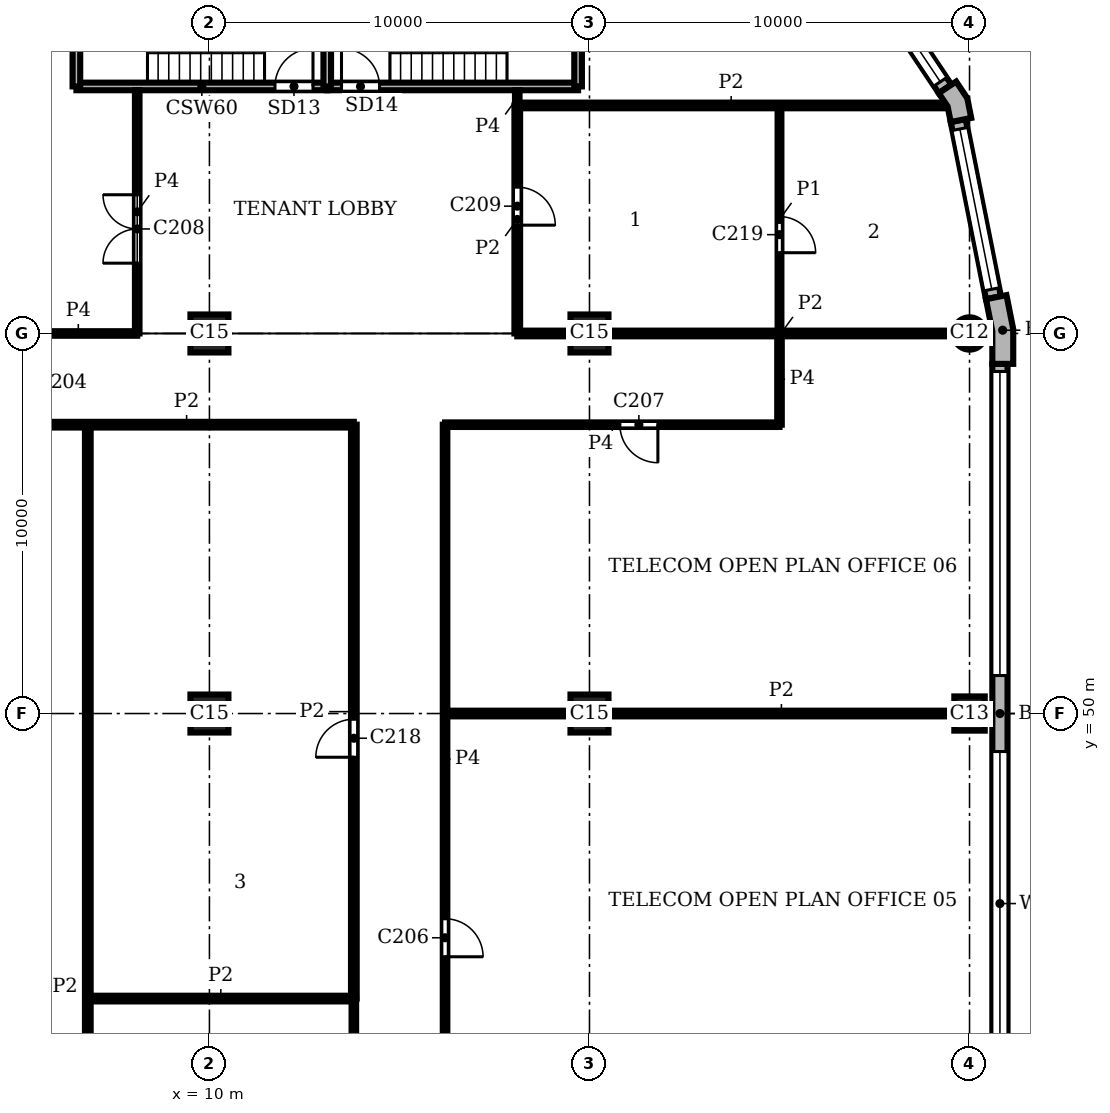
"""IFC4 building model, lengths in metres.
Left out: names, types, materials, properties, quantities, classifications, styles, units other than length and angle.
Written with IfcOpenShell. Run it as: python <this file> out.ifc"""

import sys

from ifc_helpers import new_model, si_unit, direction, frame, frame_2d, origin, origin_2d, place, context, subcontext, project, spatial, polyline, rectangle, circle, outline, extrude, element, fill, save


model = new_model("IFC4")
c1 = context("Model", 3, precision=1e-05, world=origin(), true_north=direction((0.0, 1.0)))
c2 = subcontext(c1, "Body", "Model", "MODEL_VIEW")
j1 = project(units=[si_unit("LENGTHUNIT", "METRE"), si_unit("PLANEANGLEUNIT", "RADIAN")], contexts=[c1])
p1 = place(None, origin())
s1 = spatial("IfcSite", under=j1, at=p1, CompositionType="ELEMENT")
p2 = place(p1, origin())
s2 = spatial("IfcBuilding", under=s1, at=p2, CompositionType="ELEMENT")
p3 = place(p2, frame((0.0, 0.0, 263.1)))
s3 = spatial("IfcBuildingStorey", under=s2, at=p3, CompositionType="ELEMENT", Elevation=263.1)
p4 = place(p3, frame((30.0, 50.0, 0.0), z_axis=(0.0, 0.0, 1.0), x_axis=(0.0, 1.0, 0.0)))
e1 = element("IfcColumn", 1, at=p4, inside=s3, PredefinedType="COLUMN", context=c2, shape_type="SweptSolid", body=[
    extrude(rectangle(XDim=0.9, YDim=0.8, at=origin_2d()), origin(), (0.0, 0.0, 1.0), 3.9),
])
p5 = place(p3, frame((30.0, 60.0, 0.0), z_axis=(0.0, 0.0, 1.0), x_axis=(1.0, 0.0, 0.0)))
e2 = element("IfcColumn", 2, at=p5, inside=s3, PredefinedType="COLUMN", context=c2, shape_type="SweptSolid", body=[
    extrude(circle(Radius=0.425, at=origin_2d()), origin(), (0.0, 0.0, 1.0), 3.9),
])
for number, where, z_axis, x_axis in (
    (3, (10.0, 50.0, 0.0), (0.0, 0.0, 1.0), (1.0, 0.0, 0.0)),
    (4, (10.0, 60.0, 0.0), (0.0, 0.0, 1.0), (1.0, 0.0, 0.0)),
    (5, (20.0, 50.0, 0.0), (0.0, 0.0, 1.0), (1.0, 0.0, 0.0)),
    (6, (20.0, 60.0, 0.0), (0.0, 0.0, 1.0), (1.0, 0.0, 0.0)),
):
    element("IfcColumn", number, at=place(p3, frame(where, z_axis=z_axis, x_axis=x_axis)), inside=s3, PredefinedType="COLUMN", context=c2, shape_type="SweptSolid", body=[
        extrude(rectangle(XDim=1.0, YDim=1.0, at=origin_2d()), origin(), (0.0, 0.0, 1.0), 3.9),
    ])
p6 = place(p3, origin())
e7 = element("IfcWall", 7, at=p6, inside=s3, PredefinedType="SOLIDWALL", context=c2, shape_type="SweptSolid", body=[
    extrude(outline(polyline([(31.0, 59.2), (31.15, 59.2), (31.15, 60.113), (30.972, 61.009), (30.825, 60.98), (30.432, 60.902), (30.6, 60.059), (30.6, 59.2), (31.0, 59.2)])), origin(), (0.0, 0.0, 1.0), 3.9),
])
e8 = element("IfcWall", 8, at=p6, inside=s3, PredefinedType="SOLIDWALL", context=c2, shape_type="SweptSolid", body=[
    extrude(outline(polyline([(29.897, 65.641), (30.045, 65.67), (29.941, 66.189), (29.648, 66.629), (29.523, 66.545), (29.19, 66.323), (29.423, 65.974), (29.505, 65.563), (29.897, 65.641)])), origin(), (0.0, 0.0, 1.0), 3.9),
])
p7 = place(p3, frame((30.8, 40.8, 0.0), z_axis=(0.0, 0.0, 1.0), x_axis=(0.0, 1.0, 0.0)))
e9 = element("IfcWall", 9, at=p7, inside=s3, PredefinedType="SOLIDWALL", context=c2, shape_type="SweptSolid", body=[
    extrude(rectangle(XDim=18.4, YDim=0.4, at=frame_2d((9.2, 0.0))), origin(), (0.0, 0.0, 1.0), 3.9),
])
p8 = place(p7, frame((0.2, 0.0, 0.9)))
e10 = element("IfcOpeningElement", 10, at=p8, cuts=e9, PredefinedType="OPENING", context=c2, shape_type="SweptSolid", body=[
    extrude(rectangle(XDim=8.0, YDim=2.35, at=frame_2d((4.0, 1.175))), frame((0.0, 0.21, 0.0), z_axis=(0.0, -1.0, 0.0), x_axis=(1.0, 0.0, 0.0)), (0.0, 0.0, 1.0), 0.42),
])
p9 = place(p7, frame((10.2, 0.0, 0.9)))
e11 = element("IfcOpeningElement", 11, at=p9, cuts=e9, PredefinedType="OPENING", context=c2, shape_type="SweptSolid", body=[
    extrude(rectangle(XDim=8.0, YDim=2.35, at=frame_2d((4.0, 1.175))), frame((0.0, 0.21, 0.0), z_axis=(0.0, -1.0, 0.0), x_axis=(1.0, 0.0, 0.0)), (0.0, 0.0, 1.0), 0.42),
])
p10 = place(p3, frame((30.629, 60.941, 0.0), z_axis=(0.0, 0.0, 1.0), x_axis=(-0.195098533057, 0.98078364709, 0.0)))
e12 = element("IfcWall", 12, at=p10, inside=s3, PredefinedType="SOLIDWALL", context=c2, shape_type="SweptSolid", body=[
    extrude(rectangle(XDim=4.753, YDim=0.4, at=frame_2d((2.376, 0.0))), origin(), (0.0, 0.0, 1.0), 3.9),
])
p11 = place(p10, frame((0.226, 0.0, 0.9)))
e13 = element("IfcOpeningElement", 13, at=p11, cuts=e12, PredefinedType="OPENING", context=c2, shape_type="SweptSolid", body=[
    extrude(rectangle(XDim=4.3, YDim=2.35, at=frame_2d((2.15, 1.175))), frame((0.0, 0.21, 0.0), z_axis=(0.0, -1.0, 0.0), x_axis=(1.0, 0.0, 0.0)), (0.0, 0.0, 1.0), 0.42),
])
p12 = place(p3, frame((29.357, 66.434, 0.0), z_axis=(0.0, 0.0, 1.0), x_axis=(-0.555541552266, 0.831488775454, 0.0)))
e14 = element("IfcWall", 14, at=p12, inside=s3, PredefinedType="SOLIDWALL", context=c2, shape_type="SweptSolid", body=[
    extrude(rectangle(XDim=4.753, YDim=0.4, at=frame_2d((2.376, 0.0))), origin(), (0.0, 0.0, 1.0), 3.9),
])
p13 = place(p12, frame((0.226, 0.0, 0.9)))
e15 = element("IfcOpeningElement", 15, at=p13, cuts=e14, PredefinedType="OPENING", context=c2, shape_type="SweptSolid", body=[
    extrude(rectangle(XDim=4.3, YDim=2.35, at=frame_2d((2.15, 1.175))), frame((0.0, 0.21, 0.0), z_axis=(0.0, -1.0, 0.0), x_axis=(1.0, 0.0, 0.0)), (0.0, 0.0, 1.0), 0.42),
])
p14 = place(p3, frame((6.5, 66.5, 0.0), z_axis=(0.0, 0.0, 1.0), x_axis=(1.0, 0.0, 0.0)))
e16 = element("IfcWall", 16, at=p14, inside=s3, PredefinedType="SHEAR", context=c2, shape_type="SweptSolid", body=[
    extrude(rectangle(XDim=6.6, YDim=0.2, at=frame_2d((3.3, 0.0))), origin(), (0.0, 0.0, 1.0), 3.58),
])
p15 = place(p14, frame((5.225, 0.0, 0.0)))
e17 = element("IfcOpeningElement", 17, at=p15, cuts=e16, PredefinedType="OPENING", context=c2, shape_type="SweptSolid", body=[
    extrude(rectangle(XDim=1.0, YDim=2.1, at=frame_2d((0.5, 1.05))), frame((0.0, 0.11, 0.0), z_axis=(0.0, -1.0, 0.0), x_axis=(1.0, 0.0, 0.0)), (0.0, 0.0, 1.0), 0.22),
])
p16 = place(p3, frame((13.1, 66.5, 0.0), z_axis=(0.0, 0.0, 1.0), x_axis=(1.0, 0.0, 0.0)))
e18 = element("IfcWall", 18, at=p16, inside=s3, PredefinedType="SHEAR", context=c2, shape_type="SweptSolid", body=[
    extrude(rectangle(XDim=6.6, YDim=0.2, at=frame_2d((3.3, 0.0))), origin(), (0.0, 0.0, 1.0), 3.58),
])
p17 = place(p16, frame((0.375, 0.0, 0.0)))
e19 = element("IfcOpeningElement", 19, at=p17, cuts=e18, PredefinedType="OPENING", context=c2, shape_type="SweptSolid", body=[
    extrude(rectangle(XDim=1.0, YDim=2.1, at=frame_2d((0.5, 1.05))), frame((0.0, 0.11, 0.0), z_axis=(0.0, -1.0, 0.0), x_axis=(1.0, 0.0, 0.0)), (0.0, 0.0, 1.0), 0.22),
])
for number, where, z_axis, x_axis in (
    (20, (6.5, 66.5, 0.0), (0.0, 0.0, 1.0), (0.0, 1.0, 0.0)),
    (21, (13.1, 66.5, 0.0), (0.0, 0.0, 1.0), (0.0, 1.0, 0.0)),
    (22, (19.7, 66.5, 0.0), (0.0, 0.0, 1.0), (0.0, 1.0, 0.0)),
):
    element("IfcWall", number, at=place(p3, frame(where, z_axis=z_axis, x_axis=x_axis)), inside=s3, PredefinedType="SHEAR", context=c2, shape_type="SweptSolid", body=[
        extrude(rectangle(XDim=3.3, YDim=0.2, at=frame_2d((1.65, 0.0))), origin(), (0.0, 0.0, 1.0), 3.58),
    ])
p18 = place(p3, frame((25.0, 60.0, 0.0), z_axis=(0.0, 0.0, 1.0), x_axis=(0.0, 1.0, 0.0)))
e23 = element("IfcWall", 23, at=p18, inside=s3, PredefinedType="PARTITIONING", context=c2, shape_type="SweptSolid", body=[
    extrude(rectangle(XDim=6.0, YDim=0.1, at=frame_2d((3.0, 0.0))), origin(), (0.0, 0.0, 1.0), 3.58),
])
p19 = place(p18, frame((2.125, 0.0, 0.0)))
e24 = element("IfcOpeningElement", 24, at=p19, cuts=e23, PredefinedType="OPENING", context=c2, shape_type="SweptSolid", body=[
    extrude(rectangle(XDim=0.95, YDim=2.1, at=frame_2d((0.475, 1.05))), frame((0.0, 0.06, 0.0), z_axis=(0.0, -1.0, 0.0), x_axis=(1.0, 0.0, 0.0)), (0.0, 0.0, 1.0), 0.12),
])
p20 = place(p3, frame((6.8, 28.0, 0.0), z_axis=(0.0, 0.0, 1.0), x_axis=(0.0, 1.0, 0.0)))
e25 = element("IfcWall", 25, at=p20, inside=s3, PredefinedType="PARTITIONING", context=c2, shape_type="SweptSolid", body=[
    extrude(rectangle(XDim=29.6, YDim=0.15, at=frame_2d((14.8, 0.0))), origin(), (0.0, 0.0, 1.0), 3.58),
])
p21 = place(p3, frame((13.8, 42.5, 0.0), z_axis=(0.0, 0.0, 1.0), x_axis=(0.0, 1.0, 0.0)))
e26 = element("IfcWall", 26, at=p21, inside=s3, PredefinedType="PARTITIONING", context=c2, shape_type="SweptSolid", body=[
    extrude(rectangle(XDim=15.1, YDim=0.15, at=frame_2d((7.55, 0.0))), origin(), (0.0, 0.0, 1.0), 3.58),
])
p22 = place(p21, frame((6.35, 0.0, 0.0)))
e27 = element("IfcOpeningElement", 27, at=p22, cuts=e26, PredefinedType="OPENING", context=c2, shape_type="SweptSolid", body=[
    extrude(rectangle(XDim=1.0, YDim=2.1, at=frame_2d((0.5, 1.05))), frame((0.0, 0.085, 0.0), z_axis=(0.0, -1.0, 0.0), x_axis=(1.0, 0.0, 0.0)), (0.0, 0.0, 1.0), 0.17),
])
p23 = place(p3, frame((18.1, 60.0, 0.0), z_axis=(0.0, 0.0, 1.0), x_axis=(0.0, 1.0, 0.0)))
e28 = element("IfcWall", 28, at=p23, inside=s3, PredefinedType="PARTITIONING", context=c2, shape_type="SweptSolid", body=[
    extrude(rectangle(XDim=6.0, YDim=0.15, at=frame_2d((3.0, 0.0))), origin(), (0.0, 0.0, 1.0), 3.58),
])
p24 = place(p23, frame((2.85, 0.0, 0.0)))
e29 = element("IfcOpeningElement", 29, at=p24, cuts=e28, PredefinedType="OPENING", context=c2, shape_type="SweptSolid", body=[
    extrude(rectangle(XDim=1.0, YDim=2.1, at=frame_2d((0.5, 1.05))), frame((0.0, 0.085, 0.0), z_axis=(0.0, -1.0, 0.0), x_axis=(1.0, 0.0, 0.0)), (0.0, 0.0, 1.0), 0.17),
])
p25 = place(p3, frame((6.8, 42.5, 0.0), z_axis=(0.0, 0.0, 1.0), x_axis=(1.0, 0.0, 0.0)))
e30 = element("IfcWall", 30, at=p25, inside=s3, PredefinedType="PARTITIONING", context=c2, shape_type="SweptSolid", body=[
    extrude(rectangle(XDim=7.0, YDim=0.15, at=frame_2d((3.5, 0.0))), origin(), (0.0, 0.0, 1.0), 3.58),
])
p26 = place(p3, frame((16.2, 50.0, 0.0), z_axis=(0.0, 0.0, 1.0), x_axis=(1.0, 0.0, 0.0)))
e31 = element("IfcWall", 31, at=p26, inside=s3, PredefinedType="PARTITIONING", context=c2, shape_type="SweptSolid", body=[
    extrude(rectangle(XDim=3.3, YDim=0.15, at=frame_2d((1.65, 0.0))), origin(), (0.0, 0.0, 1.0), 3.58),
])
p27 = place(p3, frame((20.5, 50.0, 0.0), z_axis=(0.0, 0.0, 1.0), x_axis=(1.0, 0.0, 0.0)))
e32 = element("IfcWall", 32, at=p27, inside=s3, PredefinedType="PARTITIONING", context=c2, shape_type="SweptSolid", body=[
    extrude(rectangle(XDim=9.1, YDim=0.15, at=frame_2d((4.55, 0.0))), origin(), (0.0, 0.0, 1.0), 3.58),
])
p28 = place(p3, frame((5.0, 57.6, 0.0), z_axis=(0.0, 0.0, 1.0), x_axis=(1.0, 0.0, 0.0)))
e33 = element("IfcWall", 33, at=p28, inside=s3, PredefinedType="PARTITIONING", context=c2, shape_type="SweptSolid", body=[
    extrude(rectangle(XDim=8.8, YDim=0.15, at=frame_2d((4.4, 0.0))), origin(), (0.0, 0.0, 1.0), 3.58),
])
p29 = place(p3, frame((18.1, 60.0, 0.0), z_axis=(0.0, 0.0, 1.0), x_axis=(1.0, 0.0, 0.0)))
e34 = element("IfcWall", 34, at=p29, inside=s3, PredefinedType="PARTITIONING", context=c2, shape_type="SweptSolid", body=[
    extrude(rectangle(XDim=1.4, YDim=0.15, at=frame_2d((0.7, 0.0))), origin(), (0.0, 0.0, 1.0), 3.58),
])
p30 = place(p3, frame((20.5, 60.0, 0.0), z_axis=(0.0, 0.0, 1.0), x_axis=(1.0, 0.0, 0.0)))
e35 = element("IfcWall", 35, at=p30, inside=s3, PredefinedType="PARTITIONING", context=c2, shape_type="SweptSolid", body=[
    extrude(rectangle(XDim=9.075, YDim=0.15, at=frame_2d((4.538, 0.0))), origin(), (0.0, 0.0, 1.0), 3.58),
])
p31 = place(p3, frame((18.1, 66.0, 0.0), z_axis=(0.0, 0.0, 1.0), x_axis=(1.0, 0.0, 0.0)))
e36 = element("IfcWall", 36, at=p31, inside=s3, PredefinedType="PARTITIONING", context=c2, shape_type="SweptSolid", body=[
    extrude(rectangle(XDim=11.256, YDim=0.15, at=frame_2d((5.628, 0.0))), origin(), (0.0, 0.0, 1.0), 3.58),
])
p32 = place(p3, frame((8.1, 60.0, 0.0), z_axis=(0.0, 0.0, 1.0), x_axis=(0.0, 1.0, 0.0)))
e37 = element("IfcWall", 37, at=p32, inside=s3, PredefinedType="PARTITIONING", context=c2, shape_type="SweptSolid", body=[
    extrude(rectangle(XDim=6.4, YDim=0.12, at=frame_2d((3.2, 0.0))), origin(), (0.0, 0.0, 1.0), 3.58),
])
p33 = place(p32, frame((1.85, 0.0, 0.0)))
e38 = element("IfcOpeningElement", 38, at=p33, cuts=e37, PredefinedType="OPENING", context=c2, shape_type="SweptSolid", body=[
    extrude(rectangle(XDim=1.8, YDim=2.1, at=frame_2d((0.9, 1.05))), frame((0.0, 0.07, 0.0), z_axis=(0.0, -1.0, 0.0), x_axis=(1.0, 0.0, 0.0)), (0.0, 0.0, 1.0), 0.14),
])
p34 = place(p3, frame((13.8, 30.8, 0.0), z_axis=(0.0, 0.0, 1.0), x_axis=(0.0, 1.0, 0.0)))
e39 = element("IfcWall", 39, at=p34, inside=s3, PredefinedType="PARTITIONING", context=c2, shape_type="SweptSolid", body=[
    extrude(rectangle(XDim=11.7, YDim=0.12, at=frame_2d((5.85, 0.0))), origin(), (0.0, 0.0, 1.0), 3.58),
])
p35 = place(p34, frame((4.85, 0.0, 0.0)))
e40 = element("IfcOpeningElement", 40, at=p35, cuts=e39, PredefinedType="OPENING", context=c2, shape_type="SweptSolid", body=[
    extrude(rectangle(XDim=1.0, YDim=2.1, at=frame_2d((0.5, 1.05))), frame((0.0, 0.07, 0.0), z_axis=(0.0, -1.0, 0.0), x_axis=(1.0, 0.0, 0.0)), (0.0, 0.0, 1.0), 0.14),
])
p36 = place(p3, frame((16.2, 40.0, 0.0), z_axis=(0.0, 0.0, 1.0), x_axis=(0.0, 1.0, 0.0)))
e41 = element("IfcWall", 41, at=p36, inside=s3, PredefinedType="PARTITIONING", context=c2, shape_type="SweptSolid", body=[
    extrude(rectangle(XDim=17.6, YDim=0.12, at=frame_2d((8.8, 0.0))), origin(), (0.0, 0.0, 1.0), 3.58),
])
p37 = place(p36, frame((3.6, 0.0, 0.0)))
e42 = element("IfcOpeningElement", 42, at=p37, cuts=e41, PredefinedType="OPENING", context=c2, shape_type="SweptSolid", body=[
    extrude(rectangle(XDim=1.0, YDim=2.1, at=frame_2d((0.5, 1.05))), frame((0.0, 0.07, 0.0), z_axis=(0.0, -1.0, 0.0), x_axis=(1.0, 0.0, 0.0)), (0.0, 0.0, 1.0), 0.14),
])
p38 = place(p3, frame((18.1, 66.0, 0.0), z_axis=(0.0, 0.0, 1.0), x_axis=(0.0, 1.0, 0.0)))
e43 = element("IfcWall", 43, at=p38, inside=s3, PredefinedType="PARTITIONING", context=c2, shape_type="SweptSolid", body=[
    extrude(rectangle(XDim=0.4, YDim=0.12, at=frame_2d((0.2, 0.0))), origin(), (0.0, 0.0, 1.0), 3.58),
])
p39 = place(p3, frame((25.0, 57.6, 0.0), z_axis=(0.0, 0.0, 1.0), x_axis=(0.0, 1.0, 0.0)))
e44 = element("IfcWall", 44, at=p39, inside=s3, PredefinedType="PARTITIONING", context=c2, shape_type="SweptSolid", body=[
    extrude(rectangle(XDim=2.4, YDim=0.12, at=frame_2d((1.2, 0.0))), origin(), (0.0, 0.0, 1.0), 3.58),
])
p40 = place(p3, frame((16.2, 57.6, 0.0), z_axis=(0.0, 0.0, 1.0), x_axis=(1.0, 0.0, 0.0)))
e45 = element("IfcWall", 45, at=p40, inside=s3, PredefinedType="PARTITIONING", context=c2, shape_type="SweptSolid", body=[
    extrude(rectangle(XDim=8.8, YDim=0.12, at=frame_2d((4.4, 0.0))), origin(), (0.0, 0.0, 1.0), 3.58),
])
p41 = place(p40, frame((4.6, 0.0, 0.0)))
e46 = element("IfcOpeningElement", 46, at=p41, cuts=e45, PredefinedType="OPENING", context=c2, shape_type="SweptSolid", body=[
    extrude(rectangle(XDim=1.0, YDim=2.1, at=frame_2d((0.5, 1.05))), frame((0.0, 0.07, 0.0), z_axis=(0.0, -1.0, 0.0), x_axis=(1.0, 0.0, 0.0)), (0.0, 0.0, 1.0), 0.14),
])
p42 = place(p3, frame((5.0, 60.0, 0.0), z_axis=(0.0, 0.0, 1.0), x_axis=(1.0, 0.0, 0.0)))
e47 = element("IfcWall", 47, at=p42, inside=s3, PredefinedType="PARTITIONING", context=c2, shape_type="SweptSolid", body=[
    extrude(rectangle(XDim=3.1, YDim=0.12, at=frame_2d((1.55, 0.0))), origin(), (0.0, 0.0, 1.0), 3.58),
])
p43 = place(p8, origin())
e48 = element("IfcWindow", 48, at=p43, inside=s3, PartitioningType="SINGLE_PANEL", PredefinedType="WINDOW", context=c2, shape_type="SweptSolid", body=[
    extrude(rectangle(XDim=8.0, YDim=2.35, at=frame_2d((4.0, 1.175))), frame((0.0, 0.16, 0.0), z_axis=(0.0, -1.0, 0.0), x_axis=(1.0, 0.0, 0.0)), (0.0, 0.0, 1.0), 0.06),
])
fill(e10, e48)
p44 = place(p9, origin())
e49 = element("IfcWindow", 49, at=p44, inside=s3, PartitioningType="SINGLE_PANEL", PredefinedType="WINDOW", context=c2, shape_type="SweptSolid", body=[
    extrude(rectangle(XDim=8.0, YDim=2.35, at=frame_2d((4.0, 1.175))), frame((0.0, 0.16, 0.0), z_axis=(0.0, -1.0, 0.0), x_axis=(1.0, 0.0, 0.0)), (0.0, 0.0, 1.0), 0.06),
])
fill(e11, e49)
p45 = place(p11, origin())
e50 = element("IfcWindow", 50, at=p45, inside=s3, PartitioningType="SINGLE_PANEL", PredefinedType="WINDOW", context=c2, shape_type="SweptSolid", body=[
    extrude(rectangle(XDim=4.3, YDim=2.35, at=frame_2d((2.15, 1.175))), frame((0.0, 0.16, 0.0), z_axis=(0.0, -1.0, 0.0), x_axis=(1.0, 0.0, 0.0)), (0.0, 0.0, 1.0), 0.06),
])
fill(e13, e50)
p46 = place(p13, origin())
e51 = element("IfcWindow", 51, at=p46, inside=s3, PartitioningType="SINGLE_PANEL", PredefinedType="WINDOW", context=c2, shape_type="SweptSolid", body=[
    extrude(rectangle(XDim=4.3, YDim=2.35, at=frame_2d((2.15, 1.175))), frame((0.0, 0.16, 0.0), z_axis=(0.0, -1.0, 0.0), x_axis=(1.0, 0.0, 0.0)), (0.0, 0.0, 1.0), 0.06),
])
fill(e15, e51)
p47 = place(p15, origin())
e52 = element("IfcDoor", 52, at=p47, inside=s3, OperationType="SINGLE_SWING_RIGHT", PredefinedType="DOOR", context=c2, shape_type="SweptSolid", body=[
    extrude(rectangle(XDim=1.0, YDim=2.1, at=frame_2d((0.5, 1.05))), frame((0.0, 0.025, 0.0), z_axis=(0.0, -1.0, 0.0), x_axis=(1.0, 0.0, 0.0)), (0.0, 0.0, 1.0), 0.05),
])
fill(e17, e52)
p48 = place(p17, origin())
e53 = element("IfcDoor", 53, at=p48, inside=s3, OperationType="SINGLE_SWING_LEFT", PredefinedType="DOOR", context=c2, shape_type="SweptSolid", body=[
    extrude(rectangle(XDim=1.0, YDim=2.1, at=frame_2d((0.5, 1.05))), frame((0.0, 0.025, 0.0), z_axis=(0.0, -1.0, 0.0), x_axis=(1.0, 0.0, 0.0)), (0.0, 0.0, 1.0), 0.05),
])
fill(e19, e53)
p49 = place(p37, frame((1.0, 0.0, 0.0), z_axis=(0.0, 0.0, 1.0), x_axis=(-1.0, 0.0, 0.0)))
e54 = element("IfcDoor", 54, at=p49, inside=s3, OperationType="SINGLE_SWING_RIGHT", PredefinedType="DOOR", context=c2, shape_type="SweptSolid", body=[
    extrude(rectangle(XDim=1.0, YDim=2.1, at=frame_2d((0.5, 1.05))), frame((0.0, 0.025, 0.0), z_axis=(0.0, -1.0, 0.0), x_axis=(1.0, 0.0, 0.0)), (0.0, 0.0, 1.0), 0.05),
])
fill(e42, e54)
p50 = place(p41, frame((1.0, 0.0, 0.0), z_axis=(0.0, 0.0, 1.0), x_axis=(-1.0, 0.0, 0.0)))
e55 = element("IfcDoor", 55, at=p50, inside=s3, OperationType="SINGLE_SWING_LEFT", PredefinedType="DOOR", context=c2, shape_type="SweptSolid", body=[
    extrude(rectangle(XDim=1.0, YDim=2.1, at=frame_2d((0.5, 1.05))), frame((0.0, 0.025, 0.0), z_axis=(0.0, -1.0, 0.0), x_axis=(1.0, 0.0, 0.0)), (0.0, 0.0, 1.0), 0.05),
])
fill(e46, e55)
p51 = place(p33, origin())
e56 = element("IfcDoor", 56, at=p51, inside=s3, OperationType="DOUBLE_DOOR_SINGLE_SWING", PredefinedType="DOOR", context=c2, shape_type="SweptSolid", body=[
    extrude(rectangle(XDim=1.8, YDim=2.1, at=frame_2d((0.9, 1.05))), frame((0.0, 0.025, 0.0), z_axis=(0.0, -1.0, 0.0), x_axis=(1.0, 0.0, 0.0)), (0.0, 0.0, 1.0), 0.05),
])
fill(e38, e56)
p52 = place(p24, frame((1.0, 0.0, 0.0), z_axis=(0.0, 0.0, 1.0), x_axis=(-1.0, 0.0, 0.0)))
e57 = element("IfcDoor", 57, at=p52, inside=s3, OperationType="SINGLE_SWING_RIGHT", PredefinedType="DOOR", context=c2, shape_type="SweptSolid", body=[
    extrude(rectangle(XDim=1.0, YDim=2.1, at=frame_2d((0.5, 1.05))), frame((0.0, 0.025, 0.0), z_axis=(0.0, -1.0, 0.0), x_axis=(1.0, 0.0, 0.0)), (0.0, 0.0, 1.0), 0.05),
])
fill(e29, e57)
p53 = place(p22, origin())
e58 = element("IfcDoor", 58, at=p53, inside=s3, OperationType="SINGLE_SWING_LEFT", PredefinedType="DOOR", context=c2, shape_type="SweptSolid", body=[
    extrude(rectangle(XDim=1.0, YDim=2.1, at=frame_2d((0.5, 1.05))), frame((0.0, 0.025, 0.0), z_axis=(0.0, -1.0, 0.0), x_axis=(1.0, 0.0, 0.0)), (0.0, 0.0, 1.0), 0.05),
])
fill(e27, e58)
p54 = place(p19, frame((0.95, 0.0, 0.0), z_axis=(0.0, 0.0, 1.0), x_axis=(-1.0, 0.0, 0.0)))
e59 = element("IfcDoor", 59, at=p54, inside=s3, OperationType="SINGLE_SWING_RIGHT", PredefinedType="DOOR", context=c2, shape_type="SweptSolid", body=[
    extrude(rectangle(XDim=0.95, YDim=2.1, at=frame_2d((0.475, 1.05))), frame((0.0, 0.025, 0.0), z_axis=(0.0, -1.0, 0.0), x_axis=(1.0, 0.0, 0.0)), (0.0, 0.0, 1.0), 0.05),
])
fill(e24, e59)
save(model, sys.argv[1])
